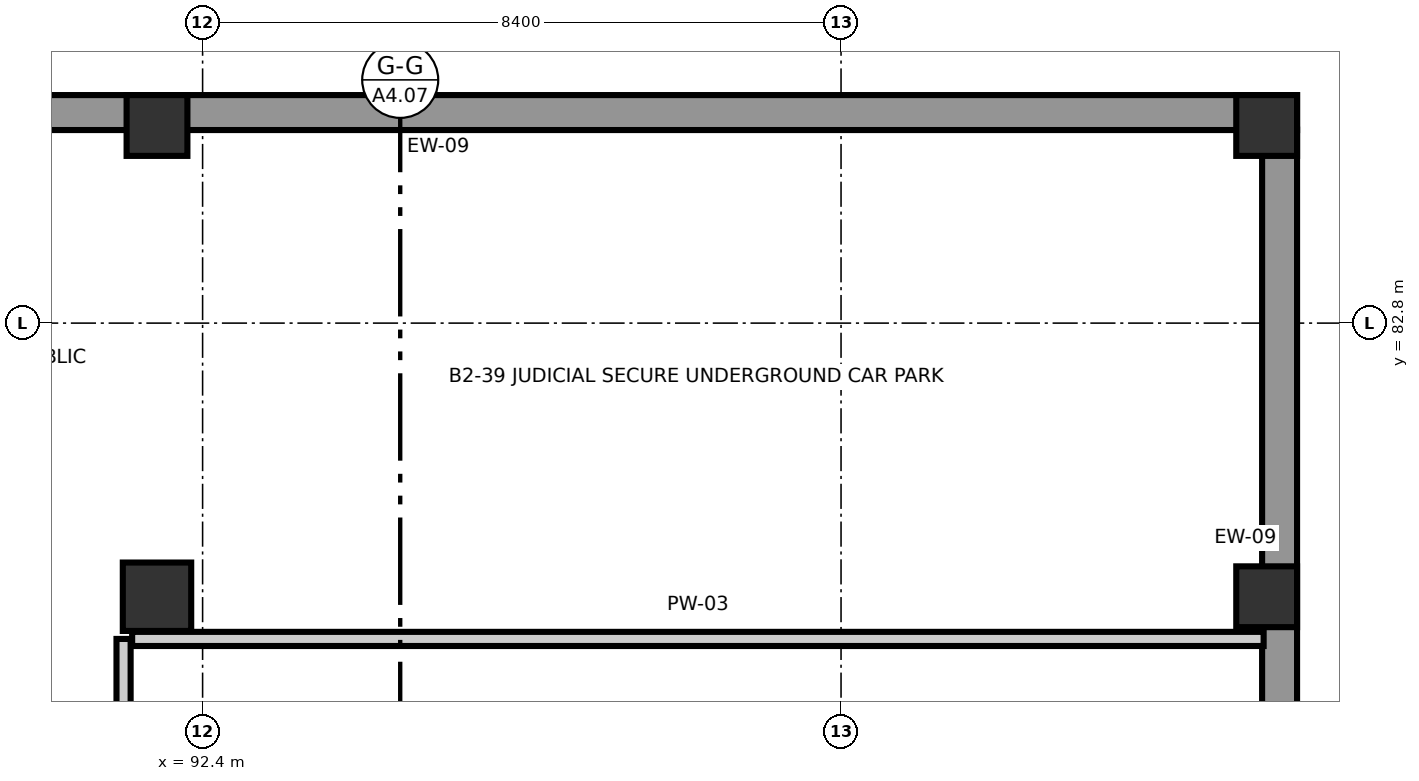
"""IFC4 building model, lengths in metres.
Left out: names, types, materials, properties, quantities, classifications, styles, units other than length and angle.
Written with IfcOpenShell. Run it as: python <this file> out.ifc"""

import sys

from ifc_helpers import new_model, si_unit, direction, frame, frame_2d, origin, origin_2d, place, context, subcontext, project, spatial, rectangle, extrude, element, save


model = new_model("IFC4")
c1 = context("Model", 3, precision=1e-05, world=origin(), true_north=direction((0.0, 1.0)))
c2 = subcontext(c1, "Body", "Model", "MODEL_VIEW")
j1 = project(units=[si_unit("LENGTHUNIT", "METRE"), si_unit("PLANEANGLEUNIT", "RADIAN")], contexts=[c1])
p1 = place(None, origin())
s1 = spatial("IfcSite", under=j1, at=p1, CompositionType="ELEMENT")
p2 = place(p1, origin())
s2 = spatial("IfcBuilding", under=s1, at=p2, CompositionType="ELEMENT")
p3 = place(p2, frame((0.0, 0.0, -8.4)))
s3 = spatial("IfcBuildingStorey", under=s2, at=p3, CompositionType="ELEMENT", Elevation=-8.4)
p4 = place(p3, frame((91.8, 79.2, 0.0), z_axis=(0.0, 0.0, 1.0), x_axis=(1.0, 0.0, 0.0)))
e1 = element("IfcColumn", 1, at=p4, inside=s3, PredefinedType="COLUMN", context=c2, shape_type="SweptSolid", body=[
    extrude(rectangle(XDim=0.9, YDim=0.9, at=origin_2d()), origin(), (0.0, 0.0, 1.0), 4.2),
])
for number, where, z_axis, x_axis in (
    (2, (91.8, 85.4, 0.0), (0.0, 0.0, 1.0), (1.0, 0.0, 0.0)),
    (3, (106.4, 79.2, 0.0), (0.0, 0.0, 1.0), (1.0, 0.0, 0.0)),
    (4, (106.4, 85.4, 0.0), (0.0, 0.0, 1.0), (1.0, 0.0, 0.0)),
):
    element("IfcColumn", number, at=place(p3, frame(where, z_axis=z_axis, x_axis=x_axis)), inside=s3, PredefinedType="COLUMN", context=c2, shape_type="SweptSolid", body=[
        extrude(rectangle(XDim=0.8, YDim=0.8, at=origin_2d()), origin(), (0.0, 0.0, 1.0), 4.2),
    ])
p5 = place(p3, frame((106.57, 41.475, 0.0), z_axis=(0.0, 0.0, 1.0), x_axis=(0.0, 1.0, 0.0)))
e5 = element("IfcWall", 5, at=p5, inside=s3, PredefinedType="SOLIDWALL", context=c2, shape_type="SweptSolid", body=[
    extrude(rectangle(XDim=43.87, YDim=0.46, at=frame_2d((21.935, 0.0))), origin(), (0.0, 0.0, 1.0), 4.2),
])
p6 = place(p3, frame((106.8, 85.57, 0.0), z_axis=(0.0, 0.0, 1.0), x_axis=(-1.0, 0.0, 0.0)))
e6 = element("IfcWall", 6, at=p6, inside=s3, PredefinedType="SOLIDWALL", context=c2, shape_type="SweptSolid", body=[
    extrude(rectangle(XDim=22.6, YDim=0.46, at=frame_2d((11.3, 0.0))), origin(), (0.0, 0.0, 1.0), 4.2),
])
p7 = place(p3, frame((91.36, 73.64, 0.0), z_axis=(0.0, 0.0, 1.0), x_axis=(0.0, 1.0, 0.0)))
e7 = element("IfcWall", 7, at=p7, inside=s3, PredefinedType="PARTITIONING", context=c2, shape_type="SweptSolid", body=[
    extrude(rectangle(XDim=5.005, YDim=0.186, at=frame_2d((2.502, 0.0))), origin(), (0.0, 0.0, 1.0), 3.11),
])
p8 = place(p7, frame((2.048, 0.0, 0.0)))
e8 = element("IfcOpeningElement", 8, at=p8, cuts=e7, PredefinedType="OPENING", context=c2, shape_type="SweptSolid", body=[
    extrude(rectangle(XDim=0.91, YDim=2.04, at=frame_2d((0.455, 1.02))), frame((0.0, 0.108, 0.0), z_axis=(0.0, -1.0, 0.0), x_axis=(1.0, 0.0, 0.0)), (0.0, 0.0, 1.0), 0.216),
])
p9 = place(p3, frame((91.473, 78.645, 0.0), z_axis=(0.0, 0.0, 1.0), x_axis=(1.0, 0.0, 0.0)))
e9 = element("IfcWall", 9, at=p9, inside=s3, PredefinedType="PARTITIONING", context=c2, shape_type="SweptSolid", body=[
    extrude(rectangle(XDim=14.887, YDim=0.186, at=frame_2d((7.444, 0.0))), origin(), (0.0, 0.0, 1.0), 3.88),
])
save(model, sys.argv[1])
